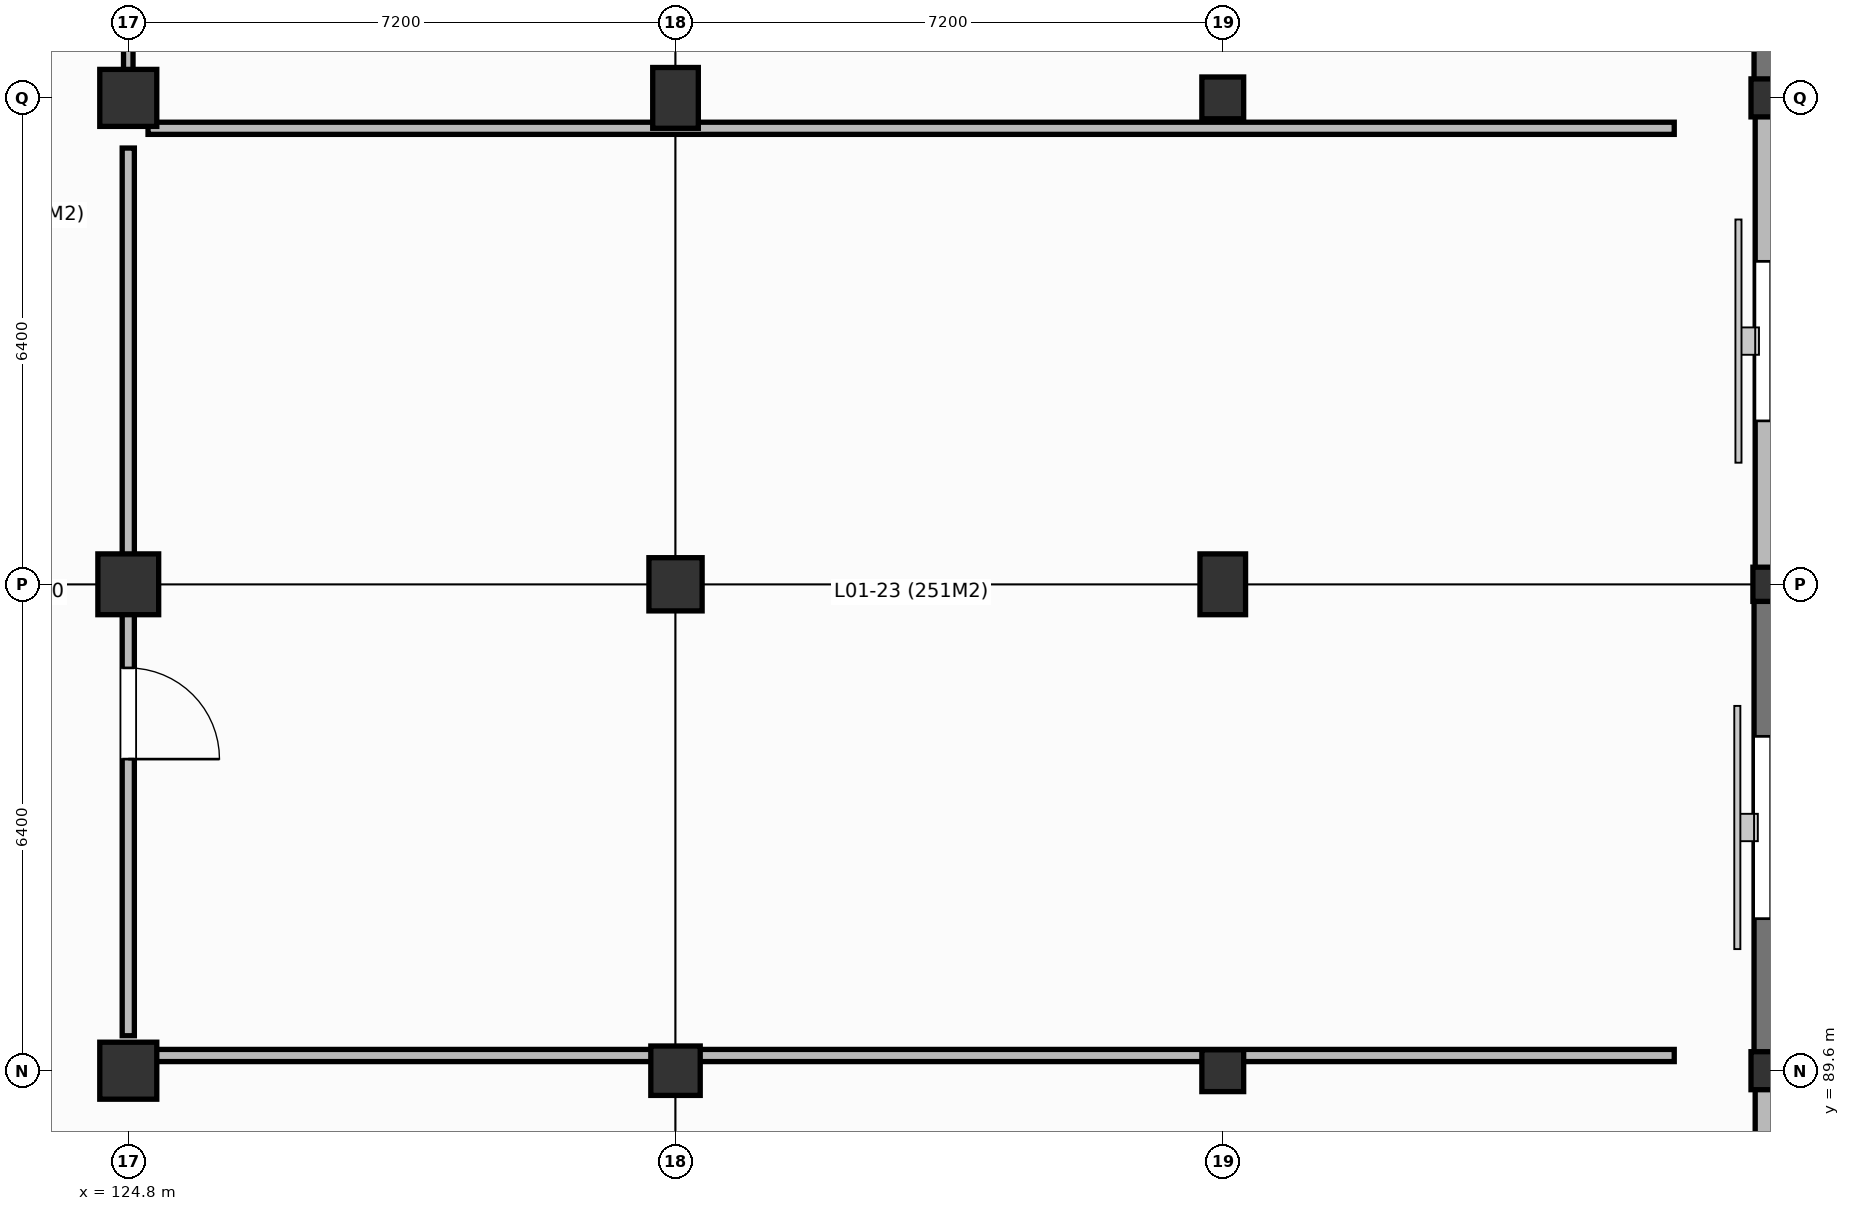
"""IFC4 building model, lengths in metres.
Left out: names, types, materials, properties, quantities, classifications, styles, units other than length and angle.
Written with IfcOpenShell. Run it as: python <this file> out.ifc"""

import sys

from ifc_helpers import new_model, si_unit, direction, frame, frame_2d, origin, origin_2d, place, context, subcontext, project, spatial, rectangle, extrude, element, fill, save


model = new_model("IFC4")
c1 = context("Model", 3, precision=1e-05, world=origin(), true_north=direction((0.0, 1.0)))
c2 = subcontext(c1, "Body", "Model", "MODEL_VIEW")
j1 = project(units=[si_unit("LENGTHUNIT", "METRE"), si_unit("PLANEANGLEUNIT", "RADIAN")], contexts=[c1])
p1 = place(None, origin())
s1 = spatial("IfcSite", under=j1, at=p1, CompositionType="ELEMENT")
p2 = place(p1, origin())
s2 = spatial("IfcBuilding", under=s1, at=p2, CompositionType="ELEMENT")
p3 = place(p2, frame((0.0, 0.0, 4.8)))
s3 = spatial("IfcBuildingStorey", under=s2, at=p3, CompositionType="ELEMENT", Elevation=4.8)
p4 = place(p3, frame((124.8, 89.6, 0.0), z_axis=(0.0, 0.0, 1.0), x_axis=(1.0, 0.0, 0.0)))
e1 = element("IfcColumn", 1, at=p4, inside=s3, PredefinedType="COLUMN", context=c2, shape_type="SweptSolid", body=[
    extrude(rectangle(XDim=0.75, YDim=0.75, at=origin_2d()), origin(), (0.0, 0.0, 1.0), 4.2),
])
p5 = place(p3, frame((124.8, 96.0, 0.0), z_axis=(0.0, 0.0, 1.0), x_axis=(1.0, 0.0, 0.0)))
e2 = element("IfcColumn", 2, at=p5, inside=s3, PredefinedType="COLUMN", context=c2, shape_type="SweptSolid", body=[
    extrude(rectangle(XDim=0.8, YDim=0.8, at=origin_2d()), origin(), (0.0, 0.0, 1.0), 4.2),
])
p6 = place(p3, frame((124.8, 102.4, 0.0), z_axis=(0.0, 0.0, 1.0), x_axis=(1.0, 0.0, 0.0)))
e3 = element("IfcColumn", 3, at=p6, inside=s3, PredefinedType="COLUMN", context=c2, shape_type="SweptSolid", body=[
    extrude(rectangle(XDim=0.75, YDim=0.75, at=origin_2d()), origin(), (0.0, 0.0, 1.0), 4.2),
])
p7 = place(p3, frame((132.0, 89.6, 0.0), z_axis=(0.0, 0.0, 1.0), x_axis=(1.0, 0.0, 0.0)))
e4 = element("IfcColumn", 4, at=p7, inside=s3, PredefinedType="COLUMN", context=c2, shape_type="SweptSolid", body=[
    extrude(rectangle(XDim=0.65, YDim=0.65, at=origin_2d()), origin(), (0.0, 0.0, 1.0), 4.2),
])
p8 = place(p3, frame((132.0, 96.0, 0.0), z_axis=(0.0, 0.0, 1.0), x_axis=(1.0, 0.0, 0.0)))
e5 = element("IfcColumn", 5, at=p8, inside=s3, PredefinedType="COLUMN", context=c2, shape_type="SweptSolid", body=[
    extrude(rectangle(XDim=0.7, YDim=0.7, at=origin_2d()), origin(), (0.0, 0.0, 1.0), 4.2),
])
p9 = place(p3, frame((132.0, 102.4, 0.0), z_axis=(0.0, 0.0, 1.0), x_axis=(1.0, 0.0, 0.0)))
e6 = element("IfcColumn", 6, at=p9, inside=s3, PredefinedType="COLUMN", context=c2, shape_type="SweptSolid", body=[
    extrude(rectangle(XDim=0.6, YDim=0.8, at=origin_2d()), origin(), (0.0, 0.0, 1.0), 4.2),
])
p10 = place(p3, frame((139.2, 89.6, 0.0), z_axis=(0.0, 0.0, 1.0), x_axis=(1.0, 0.0, 0.0)))
e7 = element("IfcColumn", 7, at=p10, inside=s3, PredefinedType="COLUMN", context=c2, shape_type="SweptSolid", body=[
    extrude(rectangle(XDim=0.55, YDim=0.55, at=origin_2d()), origin(), (0.0, 0.0, 1.0), 4.2),
])
p11 = place(p3, frame((139.2, 96.0, 0.0), z_axis=(0.0, 0.0, 1.0), x_axis=(1.0, 0.0, 0.0)))
e8 = element("IfcColumn", 8, at=p11, inside=s3, PredefinedType="COLUMN", context=c2, shape_type="SweptSolid", body=[
    extrude(rectangle(XDim=0.6, YDim=0.8, at=origin_2d()), origin(), (0.0, 0.0, 1.0), 4.2),
])
p12 = place(p3, frame((139.2, 102.4, 0.0), z_axis=(0.0, 0.0, 1.0), x_axis=(1.0, 0.0, 0.0)))
e9 = element("IfcColumn", 9, at=p12, inside=s3, PredefinedType="COLUMN", context=c2, shape_type="SweptSolid", body=[
    extrude(rectangle(XDim=0.55, YDim=0.55, at=origin_2d()), origin(), (0.0, 0.0, 1.0), 4.2),
])
p13 = place(p3, frame((146.4, 89.6, 0.0), z_axis=(0.0, 0.0, 1.0), x_axis=(1.0, 0.0, 0.0)))
e10 = element("IfcColumn", 10, at=p13, inside=s3, PredefinedType="COLUMN", context=c2, shape_type="SweptSolid", body=[
    extrude(rectangle(XDim=0.5, YDim=0.5, at=origin_2d()), origin(), (0.0, 0.0, 1.0), 4.2),
])
p14 = place(p3, frame((146.4, 96.0, 0.0), z_axis=(0.0, 0.0, 1.0), x_axis=(1.0, 0.0, 0.0)))
e11 = element("IfcColumn", 11, at=p14, inside=s3, PredefinedType="COLUMN", context=c2, shape_type="SweptSolid", body=[
    extrude(rectangle(XDim=0.45, YDim=0.45, at=origin_2d()), origin(), (0.0, 0.0, 1.0), 4.2),
])
p15 = place(p3, frame((146.4, 102.4, 0.0), z_axis=(0.0, 0.0, 1.0), x_axis=(1.0, 0.0, 0.0)))
e12 = element("IfcColumn", 12, at=p15, inside=s3, PredefinedType="COLUMN", context=c2, shape_type="SweptSolid", body=[
    extrude(rectangle(XDim=0.5, YDim=0.5, at=origin_2d()), origin(), (0.0, 0.0, 1.0), 4.2),
])
p16 = place(p3, frame((146.4, 108.8, 0.0), z_axis=(0.0, 0.0, 1.0), x_axis=(0.0, -1.0, 0.0)))
e13 = element("IfcWall", 13, at=p16, inside=s3, PredefinedType="STANDARD", context=c2, shape_type="SweptSolid", body=[
    extrude(rectangle(XDim=6.4, YDim=0.42, at=frame_2d((3.2, 0.0))), origin(), (0.0, 0.0, 1.0), 3.84),
])
p17 = place(p16, frame((2.3, 0.0, 0.8)))
e14 = element("IfcOpeningElement", 14, at=p17, cuts=e13, PredefinedType="OPENING", context=c2, shape_type="SweptSolid", body=[
    extrude(rectangle(XDim=1.8, YDim=1.45, at=frame_2d((0.9, 0.725))), frame((0.0, 0.22, 0.0), z_axis=(0.0, -1.0, 0.0), x_axis=(1.0, 0.0, 0.0)), (0.0, 0.0, 1.0), 0.44),
])
p18 = place(p3, frame((146.4, 102.4, 0.0), z_axis=(0.0, 0.0, 1.0), x_axis=(0.0, -1.0, 0.0)))
e15 = element("IfcWall", 15, at=p18, inside=s3, PredefinedType="STANDARD", context=c2, shape_type="SweptSolid", body=[
    extrude(rectangle(XDim=6.4, YDim=0.39, at=frame_2d((3.2, 0.0))), origin(), (0.0, 0.0, 1.0), 3.04),
])
p19 = place(p18, frame((2.15, 0.0, 0.8)))
e16 = element("IfcOpeningElement", 16, at=p19, cuts=e15, PredefinedType="OPENING", context=c2, shape_type="SweptSolid", body=[
    extrude(rectangle(XDim=2.1, YDim=1.45, at=frame_2d((1.05, 0.725))), frame((0.0, 0.205, 0.0), z_axis=(0.0, -1.0, 0.0), x_axis=(1.0, 0.0, 0.0)), (0.0, 0.0, 1.0), 0.41),
])
p20 = place(p3, frame((146.4, 96.0, 0.0), z_axis=(0.0, 0.0, 1.0), x_axis=(0.0, -1.0, 0.0)))
e17 = element("IfcWall", 17, at=p20, inside=s3, PredefinedType="STANDARD", context=c2, shape_type="SweptSolid", body=[
    extrude(rectangle(XDim=6.4, YDim=0.42, at=frame_2d((3.2, 0.0))), origin(), (0.0, 0.0, 1.0), 3.84),
])
p21 = place(p20, frame((2.0, 0.0, 0.8)))
e18 = element("IfcOpeningElement", 18, at=p21, cuts=e17, PredefinedType="OPENING", context=c2, shape_type="SweptSolid", body=[
    extrude(rectangle(XDim=2.4, YDim=1.45, at=frame_2d((1.2, 0.725))), frame((0.0, 0.22, 0.0), z_axis=(0.0, -1.0, 0.0), x_axis=(1.0, 0.0, 0.0)), (0.0, 0.0, 1.0), 0.44),
])
p22 = place(p3, frame((146.4, 89.6, 0.0), z_axis=(0.0, 0.0, 1.0), x_axis=(0.0, -1.0, 0.0)))
e19 = element("IfcWall", 19, at=p22, inside=s3, PredefinedType="STANDARD", context=c2, shape_type="SweptSolid", body=[
    extrude(rectangle(XDim=6.4, YDim=0.39, at=frame_2d((3.2, 0.0))), origin(), (0.0, 0.0, 1.0), 2.64),
])
p23 = place(p22, frame((1.8, 0.0, 0.8)))
e20 = element("IfcOpeningElement", 20, at=p23, cuts=e19, PredefinedType="OPENING", context=c2, shape_type="SweptSolid", body=[
    extrude(rectangle(XDim=2.8, YDim=1.6, at=frame_2d((1.4, 0.8))), frame((0.0, 0.205, 0.0), z_axis=(0.0, -1.0, 0.0), x_axis=(1.0, 0.0, 0.0)), (0.0, 0.0, 1.0), 0.41),
])
p24 = place(p3, frame((125.06, 89.8, 0.0), z_axis=(0.0, 0.0, 1.0), x_axis=(1.0, 0.0, 0.0)))
e21 = element("IfcWall", 21, at=p24, inside=s3, PredefinedType="PARTITIONING", context=c2, shape_type="SweptSolid", body=[
    extrude(rectangle(XDim=20.08, YDim=0.16, at=frame_2d((10.04, 0.0))), origin(), (0.0, 0.0, 1.0), 3.065),
])
p25 = place(p3, frame((145.14, 102.0, 0.0), z_axis=(0.0, 0.0, 1.0), x_axis=(-1.0, 0.0, 0.0)))
e22 = element("IfcWall", 22, at=p25, inside=s3, PredefinedType="PARTITIONING", context=c2, shape_type="SweptSolid", body=[
    extrude(rectangle(XDim=20.08, YDim=0.16, at=frame_2d((10.04, 0.0))), origin(), (0.0, 0.0, 1.0), 3.015),
])
p26 = place(p3, frame((124.8, 101.74, 0.0), z_axis=(0.0, 0.0, 1.0), x_axis=(0.0, -1.0, 0.0)))
e23 = element("IfcWall", 23, at=p26, inside=s3, PredefinedType="PARTITIONING", context=c2, shape_type="SweptSolid", body=[
    extrude(rectangle(XDim=11.68, YDim=0.16, at=frame_2d((5.84, 0.0))), origin(), (0.0, 0.0, 1.0), 2.665),
])
p27 = place(p26, frame((6.84, 0.0, 0.0)))
e24 = element("IfcOpeningElement", 24, at=p27, cuts=e23, PredefinedType="OPENING", context=c2, shape_type="SweptSolid", body=[
    extrude(rectangle(XDim=1.2, YDim=2.15, at=frame_2d((0.6, 1.075))), frame((0.0, 0.09, 0.0), z_axis=(0.0, -1.0, 0.0), x_axis=(1.0, 0.0, 0.0)), (0.0, 0.0, 1.0), 0.18),
])
p28 = place(p3, frame((124.8, 113.94, 0.0), z_axis=(0.0, 0.0, 1.0), x_axis=(0.0, -1.0, 0.0)))
e25 = element("IfcWall", 25, at=p28, inside=s3, PredefinedType="PARTITIONING", context=c2, shape_type="SweptSolid", body=[
    extrude(rectangle(XDim=11.68, YDim=0.125, at=frame_2d((5.84, 0.0))), origin(), (0.0, 0.0, 1.0), 2.615),
])
p29 = place(p28, frame((6.15, 0.0, 0.0)))
e26 = element("IfcOpeningElement", 26, at=p29, cuts=e25, PredefinedType="OPENING", context=c2, shape_type="SweptSolid", body=[
    extrude(rectangle(XDim=0.98, YDim=2.1, at=frame_2d((0.49, 1.05))), frame((0.0, 0.073, 0.0), z_axis=(0.0, -1.0, 0.0), x_axis=(1.0, 0.0, 0.0)), (0.0, 0.0, 1.0), 0.145),
])
p30 = place(p19, origin())
e27 = element("IfcWindow", 27, at=p30, inside=s3, PartitioningType="SINGLE_PANEL", PredefinedType="WINDOW", context=c2, shape_type="SweptSolid", body=[
    extrude(rectangle(XDim=2.1, YDim=1.45, at=frame_2d((1.05, 0.725))), frame((0.0, 0.03, 0.0), z_axis=(0.0, -1.0, 0.0), x_axis=(1.0, 0.0, 0.0)), (0.0, 0.0, 1.0), 0.06),
])
fill(e16, e27)
p31 = place(p21, origin())
e28 = element("IfcWindow", 28, at=p31, inside=s3, PartitioningType="TRIPLE_PANEL_VERTICAL", PredefinedType="WINDOW", context=c2, shape_type="SweptSolid", body=[
    extrude(rectangle(XDim=2.4, YDim=1.45, at=frame_2d((1.2, 0.725))), frame((0.0, 0.03, 0.0), z_axis=(0.0, -1.0, 0.0), x_axis=(1.0, 0.0, 0.0)), (0.0, 0.0, 1.0), 0.06),
])
fill(e18, e28)
p32 = place(p27, origin())
e29 = element("IfcDoor", 29, at=p32, inside=s3, OperationType="SINGLE_SWING_RIGHT", PredefinedType="DOOR", context=c2, shape_type="SweptSolid", body=[
    extrude(rectangle(XDim=1.2, YDim=2.15, at=frame_2d((0.6, 1.075))), frame((0.0, 0.025, 0.0), z_axis=(0.0, -1.0, 0.0), x_axis=(1.0, 0.0, 0.0)), (0.0, 0.0, 1.0), 0.05),
])
fill(e24, e29)
save(model, sys.argv[1])
